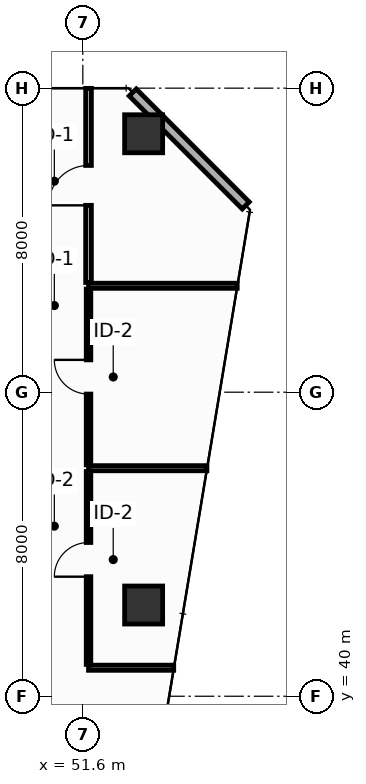
"""IFC4 building model, lengths in metres.
Left out: names, types, materials, properties, quantities, classifications, styles, units other than length and angle.
Written with IfcOpenShell. Run it as: python <this file> out.ifc"""

import sys

from ifc_helpers import new_model, si_unit, direction, frame, frame_2d, origin, origin_2d, place, context, subcontext, project, spatial, rectangle, hollow_rectangle, extrude, element, fill, save


model = new_model("IFC4")
c1 = context("Model", 3, precision=1e-05, world=origin(), true_north=direction((0.0, 1.0)))
c2 = subcontext(c1, "Body", "Model", "MODEL_VIEW")
j1 = project(units=[si_unit("LENGTHUNIT", "METRE"), si_unit("PLANEANGLEUNIT", "RADIAN")], contexts=[c1])
p1 = place(None, origin())
s1 = spatial("IfcSite", under=j1, at=p1, CompositionType="ELEMENT")
p2 = place(p1, origin())
s2 = spatial("IfcBuilding", under=s1, at=p2, CompositionType="ELEMENT")
p3 = place(p2, frame((0.0, 0.0, 133.4)))
s3 = spatial("IfcBuildingStorey", under=s2, at=p3, CompositionType="ELEMENT", Elevation=133.4)
for number, where, z_axis, x_axis in (
    (1, (53.2, 54.8, 0.0), (0.0, 0.0, 1.0), (1.0, 0.0, 0.0)),
    (2, (53.2, 42.4, 0.0), (0.0, 0.0, 1.0), (1.0, 0.0, 0.0)),
):
    element("IfcColumn", number, at=place(p3, frame(where, z_axis=z_axis, x_axis=x_axis)), inside=s3, PredefinedType="COLUMN", context=c2, shape_type="SweptSolid", body=[
        extrude(hollow_rectangle(XDim=1.0, YDim=1.0, WallThickness=0.045, at=origin_2d()), origin(), (0.0, 0.0, 1.0), 3.8),
    ])
p4 = place(p3, frame((55.887, 52.913, 0.0), z_axis=(0.0, 0.0, 1.0), x_axis=(-0.707106781187, 0.707106781187, 0.0)))
e3 = element("IfcWall", 3, at=p4, inside=s3, PredefinedType="STANDARD", context=c2, shape_type="SweptSolid", body=[
    extrude(rectangle(XDim=4.206, YDim=0.26, at=frame_2d((2.103, 0.0))), origin(), (0.0, 0.0, 1.0), 3.55),
])
p5 = place(p3, frame((51.75, 40.75, 0.0), z_axis=(0.0, 0.0, 1.0), x_axis=(1.0, 0.0, 0.0)))
e4 = element("IfcWall", 4, at=p5, inside=s3, PredefinedType="PARTITIONING", context=c2, shape_type="SweptSolid", body=[
    extrude(rectangle(XDim=2.242, YDim=0.135, at=frame_2d((1.121, 0.0))), origin(), (0.0, 0.0, 1.0), 3.035),
])
p6 = place(p3, frame((51.75, 46.0, 0.0), z_axis=(0.0, 0.0, 1.0), x_axis=(1.0, 0.0, 0.0)))
e5 = element("IfcWall", 5, at=p6, inside=s3, PredefinedType="PARTITIONING", context=c2, shape_type="SweptSolid", body=[
    extrude(rectangle(XDim=3.115, YDim=0.135, at=frame_2d((1.557, 0.0))), origin(), (0.0, 0.0, 1.0), 2.835),
])
p7 = place(p3, frame((51.75, 50.8, 0.0), z_axis=(0.0, 0.0, 1.0), x_axis=(1.0, 0.0, 0.0)))
e6 = element("IfcWall", 6, at=p7, inside=s3, PredefinedType="PARTITIONING", context=c2, shape_type="SweptSolid", body=[
    extrude(rectangle(XDim=3.912, YDim=0.135, at=frame_2d((1.956, 0.0))), origin(), (0.0, 0.0, 1.0), 2.835),
])
p8 = place(p3, frame((51.75, 40.837, 0.0), z_axis=(0.0, 0.0, 1.0), x_axis=(0.0, 1.0, 0.0)))
e7 = element("IfcWall", 7, at=p8, inside=s3, PredefinedType="PARTITIONING", context=c2, shape_type="SweptSolid", body=[
    extrude(rectangle(XDim=5.075, YDim=0.12, at=frame_2d((2.538, 0.0))), origin(), (0.0, 0.0, 1.0), 2.835),
])
p9 = place(p8, frame((2.308, 0.0, 0.0)))
e8 = element("IfcOpeningElement", 8, at=p9, cuts=e7, PredefinedType="OPENING", context=c2, shape_type="SweptSolid", body=[
    extrude(rectangle(XDim=0.9, YDim=2.1, at=frame_2d((0.45, 1.05))), frame((0.0, 0.07, 0.0), z_axis=(0.0, -1.0, 0.0), x_axis=(1.0, 0.0, 0.0)), (0.0, 0.0, 1.0), 0.14),
])
p10 = place(p3, frame((51.75, 46.087, 0.0), z_axis=(0.0, 0.0, 1.0), x_axis=(0.0, 1.0, 0.0)))
e9 = element("IfcWall", 9, at=p10, inside=s3, PredefinedType="PARTITIONING", context=c2, shape_type="SweptSolid", body=[
    extrude(rectangle(XDim=4.625, YDim=0.12, at=frame_2d((2.312, 0.0))), origin(), (0.0, 0.0, 1.0), 3.55),
])
p11 = place(p10, frame((1.863, 0.0, 0.0)))
e10 = element("IfcOpeningElement", 10, at=p11, cuts=e9, PredefinedType="OPENING", context=c2, shape_type="SweptSolid", body=[
    extrude(rectangle(XDim=0.9, YDim=2.1, at=frame_2d((0.45, 1.05))), frame((0.0, 0.07, 0.0), z_axis=(0.0, -1.0, 0.0), x_axis=(1.0, 0.0, 0.0)), (0.0, 0.0, 1.0), 0.14),
])
p12 = place(p3, frame((51.75, 50.887, 0.0), z_axis=(0.0, 0.0, 1.0), x_axis=(0.0, 1.0, 0.0)))
e11 = element("IfcWall", 11, at=p12, inside=s3, PredefinedType="PARTITIONING", context=c2, shape_type="SweptSolid", body=[
    extrude(rectangle(XDim=5.108, YDim=0.15, at=frame_2d((2.554, 0.0))), origin(), (0.0, 0.0, 1.0), 2.935),
])
p13 = place(p12, frame((2.029, 0.0, 0.0)))
e12 = element("IfcOpeningElement", 12, at=p13, cuts=e11, PredefinedType="OPENING", context=c2, shape_type="SweptSolid", body=[
    extrude(rectangle(XDim=1.05, YDim=2.15, at=frame_2d((0.525, 1.075))), frame((0.0, 0.085, 0.0), z_axis=(0.0, -1.0, 0.0), x_axis=(1.0, 0.0, 0.0)), (0.0, 0.0, 1.0), 0.17),
])
p14 = place(p9, origin())
e13 = element("IfcDoor", 13, at=p14, inside=s3, OperationType="SINGLE_SWING_LEFT", PredefinedType="DOOR", context=c2, shape_type="SweptSolid", body=[
    extrude(rectangle(XDim=0.9, YDim=2.1, at=frame_2d((0.45, 1.05))), frame((0.0, 0.025, 0.0), z_axis=(0.0, -1.0, 0.0), x_axis=(1.0, 0.0, 0.0)), (0.0, 0.0, 1.0), 0.05),
])
fill(e8, e13)
p15 = place(p11, origin())
e14 = element("IfcDoor", 14, at=p15, inside=s3, OperationType="SINGLE_SWING_RIGHT", PredefinedType="DOOR", context=c2, shape_type="SweptSolid", body=[
    extrude(rectangle(XDim=0.9, YDim=2.1, at=frame_2d((0.45, 1.05))), frame((0.0, 0.025, 0.0), z_axis=(0.0, -1.0, 0.0), x_axis=(1.0, 0.0, 0.0)), (0.0, 0.0, 1.0), 0.05),
])
fill(e10, e14)
p16 = place(p13, origin())
e15 = element("IfcDoor", 15, at=p16, inside=s3, OperationType="SINGLE_SWING_LEFT", PredefinedType="DOOR", context=c2, shape_type="SweptSolid", body=[
    extrude(rectangle(XDim=1.05, YDim=2.15, at=frame_2d((0.525, 1.075))), frame((0.0, 0.025, 0.0), z_axis=(0.0, -1.0, 0.0), x_axis=(1.0, 0.0, 0.0)), (0.0, 0.0, 1.0), 0.05),
])
fill(e12, e15)
save(model, sys.argv[1])
